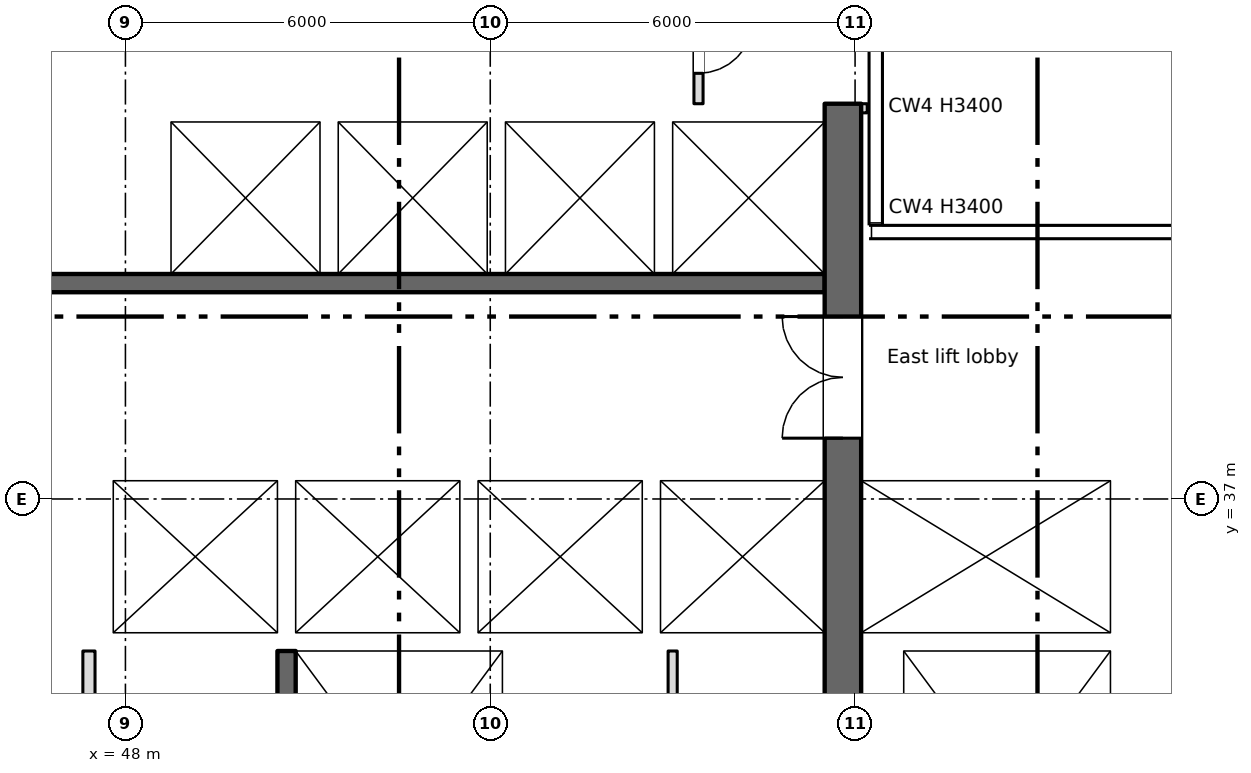
"""IFC4 building model, lengths in metres.
Left out: names, types, materials, properties, quantities, classifications, styles, units other than length and angle.
Written with IfcOpenShell. Run it as: python <this file> out.ifc"""

import sys

from ifc_helpers import new_model, si_unit, direction, frame, frame_2d, origin, place, context, subcontext, project, spatial, rectangle, extrude, element, fill, save


model = new_model("IFC4")
c1 = context("Model", 3, precision=1e-05, world=origin(), true_north=direction((0.0, 1.0)))
c2 = subcontext(c1, "Body", "Model", "MODEL_VIEW")
j1 = project(units=[si_unit("LENGTHUNIT", "METRE"), si_unit("PLANEANGLEUNIT", "RADIAN")], contexts=[c1])
p1 = place(None, origin())
s1 = spatial("IfcSite", under=j1, at=p1, CompositionType="ELEMENT")
p2 = place(p1, origin())
s2 = spatial("IfcBuilding", under=s1, at=p2, CompositionType="ELEMENT")
p3 = place(p2, frame((0.0, 0.0, 246.95)))
s3 = spatial("IfcBuildingStorey", under=s2, at=p3, CompositionType="ELEMENT", Elevation=246.95)
p4 = place(p3, frame((64.35, 34.8, 0.0), z_axis=(0.0, 0.0, 1.0), x_axis=(0.0, 1.0, 0.0)))
e1 = element("IfcWall", 1, at=p4, inside=s3, PredefinedType="SHEAR", context=c2, shape_type="SweptSolid", body=[
    extrude(rectangle(XDim=6.45, YDim=0.3, at=frame_2d((3.225, 0.0))), origin(), (0.0, 0.0, 1.0), 3.4),
])
p5 = place(p3, frame((59.8, 28.4, 0.0), z_axis=(0.0, 0.0, 1.0), x_axis=(0.0, 1.0, 0.0)))
e2 = element("IfcWall", 2, at=p5, inside=s3, PredefinedType="SHEAR", context=c2, shape_type="SweptSolid", body=[
    extrude(rectangle(XDim=15.1, YDim=0.6, at=frame_2d((7.55, 0.0))), origin(), (0.0, 0.0, 1.0), 3.4),
])
p6 = place(p5, frame((9.6, 0.0, 0.0)))
e3 = element("IfcOpeningElement", 3, at=p6, cuts=e2, PredefinedType="OPENING", context=c2, shape_type="SweptSolid", body=[
    extrude(rectangle(XDim=2.0, YDim=2.1, at=frame_2d((1.0, 1.05))), frame((0.0, 0.31, 0.0), z_axis=(0.0, -1.0, 0.0), x_axis=(1.0, 0.0, 0.0)), (0.0, 0.0, 1.0), 0.62),
])
p7 = place(p3, frame((50.65, 34.5, 0.0), z_axis=(0.0, 0.0, 1.0), x_axis=(0.0, -1.0, 0.0)))
e4 = element("IfcWall", 4, at=p7, inside=s3, PredefinedType="SHEAR", context=c2, shape_type="SweptSolid", body=[
    extrude(rectangle(XDim=6.1, YDim=0.3, at=frame_2d((3.05, 0.0))), origin(), (0.0, 0.0, 1.0), 3.4),
])
p8 = place(p7, frame((4.95, 0.0, 0.0)))
e5 = element("IfcOpeningElement", 5, at=p8, cuts=e4, PredefinedType="OPENING", context=c2, shape_type="SweptSolid", body=[
    extrude(rectangle(XDim=1.1, YDim=2.1, at=frame_2d((0.55, 1.05))), frame((0.0, 0.16, 0.0), z_axis=(0.0, -1.0, 0.0), x_axis=(1.0, 0.0, 0.0)), (0.0, 0.0, 1.0), 0.32),
])
p9 = place(p3, frame((54.35, 28.4, 0.0), z_axis=(0.0, 0.0, 1.0), x_axis=(0.0, 1.0, 0.0)))
e6 = element("IfcWall", 6, at=p9, inside=s3, PredefinedType="SHEAR", context=c2, shape_type="SweptSolid", body=[
    extrude(rectangle(XDim=6.1, YDim=0.3, at=frame_2d((3.05, 0.0))), origin(), (0.0, 0.0, 1.0), 3.4),
])
p10 = place(p3, frame((60.45, 28.4, 0.0), z_axis=(0.0, 0.0, 1.0), x_axis=(0.0, 1.0, 0.0)))
e7 = element("IfcWall", 7, at=p10, inside=s3, PredefinedType="SHEAR", context=c2, shape_type="SweptSolid", body=[
    extrude(rectangle(XDim=6.1, YDim=0.7, at=frame_2d((3.05, 0.0))), origin(), (0.0, 0.0, 1.0), 3.4),
])
p11 = place(p3, frame((64.35, 28.4, 0.0), z_axis=(0.0, 0.0, 1.0), x_axis=(0.0, 1.0, 0.0)))
e8 = element("IfcWall", 8, at=p11, inside=s3, PredefinedType="SHEAR", context=c2, shape_type="SweptSolid", body=[
    extrude(rectangle(XDim=6.1, YDim=0.3, at=frame_2d((3.05, 0.0))), origin(), (0.0, 0.0, 1.0), 3.4),
])
p12 = place(p3, frame((47.3, 34.65, 0.0), z_axis=(0.0, 0.0, 1.0), x_axis=(1.0, 0.0, 0.0)))
e9 = element("IfcWall", 9, at=p12, inside=s3, PredefinedType="SHEAR", context=c2, shape_type="SweptSolid", body=[
    extrude(rectangle(XDim=12.2, YDim=0.3, at=frame_2d((6.1, 0.0))), origin(), (0.0, 0.0, 1.0), 3.4),
])
p13 = place(p12, frame((1.3, 0.0, 0.0)))
e10 = element("IfcOpeningElement", 10, at=p13, cuts=e9, PredefinedType="OPENING", context=c2, shape_type="SweptSolid", body=[
    extrude(rectangle(XDim=1.1, YDim=2.1, at=frame_2d((0.55, 1.05))), frame((0.0, 0.16, 0.0), z_axis=(0.0, -1.0, 0.0), x_axis=(1.0, 0.0, 0.0)), (0.0, 0.0, 1.0), 0.32),
])
p14 = place(p3, frame((60.1, 34.65, 0.0), z_axis=(0.0, 0.0, 1.0), x_axis=(1.0, 0.0, 0.0)))
e11 = element("IfcWall", 11, at=p14, inside=s3, PredefinedType="SHEAR", context=c2, shape_type="SweptSolid", body=[
    extrude(rectangle(XDim=4.4, YDim=0.3, at=frame_2d((2.2, 0.0))), origin(), (0.0, 0.0, 1.0), 3.4),
])
p15 = place(p3, frame((47.3, 37.45, 0.0), z_axis=(0.0, 0.0, 1.0), x_axis=(1.0, 0.0, 0.0)))
e12 = element("IfcWall", 12, at=p15, inside=s3, PredefinedType="SHEAR", context=c2, shape_type="SweptSolid", body=[
    extrude(rectangle(XDim=12.2, YDim=0.3, at=frame_2d((6.1, 0.0))), origin(), (0.0, 0.0, 1.0), 3.4),
])
p16 = place(p15, frame((4.3, 0.0, 0.0)))
e13 = element("IfcOpeningElement", 13, at=p16, cuts=e12, PredefinedType="OPENING", context=c2, shape_type="SweptSolid", body=[
    extrude(rectangle(XDim=1.1, YDim=2.1, at=frame_2d((0.55, 1.05))), frame((0.0, 0.16, 0.0), z_axis=(0.0, -1.0, 0.0), x_axis=(1.0, 0.0, 0.0)), (0.0, 0.0, 1.0), 0.32),
])
p17 = place(p15, frame((7.3, 0.0, 0.0)))
e14 = element("IfcOpeningElement", 14, at=p17, cuts=e12, PredefinedType="OPENING", context=c2, shape_type="SweptSolid", body=[
    extrude(rectangle(XDim=1.1, YDim=2.1, at=frame_2d((0.55, 1.05))), frame((0.0, 0.16, 0.0), z_axis=(0.0, -1.0, 0.0), x_axis=(1.0, 0.0, 0.0)), (0.0, 0.0, 1.0), 0.32),
])
p18 = place(p15, frame((10.3, 0.0, 0.0)))
e15 = element("IfcOpeningElement", 15, at=p18, cuts=e12, PredefinedType="OPENING", context=c2, shape_type="SweptSolid", body=[
    extrude(rectangle(XDim=1.1, YDim=2.1, at=frame_2d((0.55, 1.05))), frame((0.0, 0.16, 0.0), z_axis=(0.0, -1.0, 0.0), x_axis=(1.0, 0.0, 0.0)), (0.0, 0.0, 1.0), 0.32),
])
p19 = place(p3, frame((60.1, 37.45, 0.0), z_axis=(0.0, 0.0, 1.0), x_axis=(1.0, 0.0, 0.0)))
e16 = element("IfcWall", 16, at=p19, inside=s3, PredefinedType="SHEAR", context=c2, shape_type="SweptSolid", body=[
    extrude(rectangle(XDim=4.1, YDim=0.3, at=frame_2d((2.05, 0.0))), origin(), (0.0, 0.0, 1.0), 3.4),
])
p20 = place(p19, frame((1.5, 0.0, 0.0)))
e17 = element("IfcOpeningElement", 17, at=p20, cuts=e16, PredefinedType="OPENING", context=c2, shape_type="SweptSolid", body=[
    extrude(rectangle(XDim=1.1, YDim=2.1, at=frame_2d((0.55, 1.05))), frame((0.0, 0.16, 0.0), z_axis=(0.0, -1.0, 0.0), x_axis=(1.0, 0.0, 0.0)), (0.0, 0.0, 1.0), 0.32),
])
p21 = place(p3, frame((47.55, 34.8, 0.0), z_axis=(0.0, 0.0, 1.0), x_axis=(0.0, 1.0, 0.0)))
e18 = element("IfcWall", 18, at=p21, inside=s3, PredefinedType="SHEAR", context=c2, shape_type="SweptSolid", body=[
    extrude(rectangle(XDim=2.5, YDim=0.5, at=frame_2d((1.25, 0.0))), origin(), (0.0, 0.0, 1.0), 3.4),
])
p22 = place(p3, frame((50.65, 34.8, 0.0), z_axis=(0.0, 0.0, 1.0), x_axis=(0.0, 1.0, 0.0)))
e19 = element("IfcWall", 19, at=p22, inside=s3, PredefinedType="SHEAR", context=c2, shape_type="SweptSolid", body=[
    extrude(rectangle(XDim=2.5, YDim=0.3, at=frame_2d((1.25, 0.0))), origin(), (0.0, 0.0, 1.0), 3.4),
])
p23 = place(p3, frame((18.5, 40.55, 0.0), z_axis=(0.0, 0.0, 1.0), x_axis=(1.0, 0.0, 0.0)))
e20 = element("IfcWall", 20, at=p23, inside=s3, PredefinedType="SHEAR", context=c2, shape_type="SweptSolid", body=[
    extrude(rectangle(XDim=41.0, YDim=0.3, at=frame_2d((20.5, 0.0))), origin(), (0.0, 0.0, 1.0), 3.4),
])
p24 = place(p23, frame((2.15, 0.0, 0.0)))
e21 = element("IfcOpeningElement", 21, at=p24, cuts=e20, PredefinedType="OPENING", context=c2, shape_type="SweptSolid", body=[
    extrude(rectangle(XDim=0.9, YDim=2.1, at=frame_2d((0.45, 1.05))), frame((0.0, 0.16, 0.0), z_axis=(0.0, -1.0, 0.0), x_axis=(1.0, 0.0, 0.0)), (0.0, 0.0, 1.0), 0.32),
])
p25 = place(p23, frame((15.9, 0.0, 0.0)))
e22 = element("IfcOpeningElement", 22, at=p25, cuts=e20, PredefinedType="OPENING", context=c2, shape_type="SweptSolid", body=[
    extrude(rectangle(XDim=0.9, YDim=2.1, at=frame_2d((0.45, 1.05))), frame((0.0, 0.16, 0.0), z_axis=(0.0, -1.0, 0.0), x_axis=(1.0, 0.0, 0.0)), (0.0, 0.0, 1.0), 0.32),
])
p26 = place(p23, frame((21.4, 0.0, 0.0)))
e23 = element("IfcOpeningElement", 23, at=p26, cuts=e20, PredefinedType="OPENING", context=c2, shape_type="SweptSolid", body=[
    extrude(rectangle(XDim=0.9, YDim=2.1, at=frame_2d((0.45, 1.05))), frame((0.0, 0.16, 0.0), z_axis=(0.0, -1.0, 0.0), x_axis=(1.0, 0.0, 0.0)), (0.0, 0.0, 1.0), 0.32),
])
p27 = place(p23, frame((26.9, 0.0, 0.0)))
e24 = element("IfcOpeningElement", 24, at=p27, cuts=e20, PredefinedType="OPENING", context=c2, shape_type="SweptSolid", body=[
    extrude(rectangle(XDim=0.9, YDim=2.1, at=frame_2d((0.45, 1.05))), frame((0.0, 0.16, 0.0), z_axis=(0.0, -1.0, 0.0), x_axis=(1.0, 0.0, 0.0)), (0.0, 0.0, 1.0), 0.32),
])
p28 = place(p23, frame((6.175, 0.0, 0.0)))
e25 = element("IfcOpeningElement", 25, at=p28, cuts=e20, PredefinedType="OPENING", context=c2, shape_type="SweptSolid", body=[
    extrude(rectangle(XDim=1.1, YDim=2.1, at=frame_2d((0.55, 1.05))), frame((0.0, 0.16, 0.0), z_axis=(0.0, -1.0, 0.0), x_axis=(1.0, 0.0, 0.0)), (0.0, 0.0, 1.0), 0.32),
])
p29 = place(p23, frame((8.925, 0.0, 0.0)))
e26 = element("IfcOpeningElement", 26, at=p29, cuts=e20, PredefinedType="OPENING", context=c2, shape_type="SweptSolid", body=[
    extrude(rectangle(XDim=1.1, YDim=2.1, at=frame_2d((0.55, 1.05))), frame((0.0, 0.16, 0.0), z_axis=(0.0, -1.0, 0.0), x_axis=(1.0, 0.0, 0.0)), (0.0, 0.0, 1.0), 0.32),
])
p30 = place(p23, frame((11.675, 0.0, 0.0)))
e27 = element("IfcOpeningElement", 27, at=p30, cuts=e20, PredefinedType="OPENING", context=c2, shape_type="SweptSolid", body=[
    extrude(rectangle(XDim=1.1, YDim=2.1, at=frame_2d((0.55, 1.05))), frame((0.0, 0.16, 0.0), z_axis=(0.0, -1.0, 0.0), x_axis=(1.0, 0.0, 0.0)), (0.0, 0.0, 1.0), 0.32),
])
p31 = place(p23, frame((30.925, 0.0, 0.0)))
e28 = element("IfcOpeningElement", 28, at=p31, cuts=e20, PredefinedType="OPENING", context=c2, shape_type="SweptSolid", body=[
    extrude(rectangle(XDim=1.1, YDim=2.1, at=frame_2d((0.55, 1.05))), frame((0.0, 0.16, 0.0), z_axis=(0.0, -1.0, 0.0), x_axis=(1.0, 0.0, 0.0)), (0.0, 0.0, 1.0), 0.32),
])
p32 = place(p23, frame((33.675, 0.0, 0.0)))
e29 = element("IfcOpeningElement", 29, at=p32, cuts=e20, PredefinedType="OPENING", context=c2, shape_type="SweptSolid", body=[
    extrude(rectangle(XDim=1.1, YDim=2.1, at=frame_2d((0.55, 1.05))), frame((0.0, 0.16, 0.0), z_axis=(0.0, -1.0, 0.0), x_axis=(1.0, 0.0, 0.0)), (0.0, 0.0, 1.0), 0.32),
])
p33 = place(p23, frame((36.375, 0.0, 0.0)))
e30 = element("IfcOpeningElement", 30, at=p33, cuts=e20, PredefinedType="OPENING", context=c2, shape_type="SweptSolid", body=[
    extrude(rectangle(XDim=1.2, YDim=2.1, at=frame_2d((0.6, 1.05))), frame((0.0, 0.16, 0.0), z_axis=(0.0, -1.0, 0.0), x_axis=(1.0, 0.0, 0.0)), (0.0, 0.0, 1.0), 0.32),
])
p34 = place(p23, frame((39.15, 0.0, 0.0)))
e31 = element("IfcOpeningElement", 31, at=p34, cuts=e20, PredefinedType="OPENING", context=c2, shape_type="SweptSolid", body=[
    extrude(rectangle(XDim=1.2, YDim=2.1, at=frame_2d((0.6, 1.05))), frame((0.0, 0.16, 0.0), z_axis=(0.0, -1.0, 0.0), x_axis=(1.0, 0.0, 0.0)), (0.0, 0.0, 1.0), 0.32),
])
p35 = place(p3, frame((18.5, 43.35, 0.0), z_axis=(0.0, 0.0, 1.0), x_axis=(1.0, 0.0, 0.0)))
e32 = element("IfcWall", 32, at=p35, inside=s3, PredefinedType="SHEAR", context=c2, shape_type="SweptSolid", body=[
    extrude(rectangle(XDim=41.0, YDim=0.3, at=frame_2d((20.5, 0.0))), origin(), (0.0, 0.0, 1.0), 3.4),
])
for number, where, z_axis, x_axis in (
    (33, (53.65, 34.8, 0.0), (0.0, 0.0, 1.0), (0.0, 1.0, 0.0)),
    (34, (56.65, 34.8, 0.0), (0.0, 0.0, 1.0), (0.0, 1.0, 0.0)),
    (35, (48.6, 40.7, 0.0), (0.0, 0.0, 1.0), (0.0, 1.0, 0.0)),
    (36, (51.35, 40.7, 0.0), (0.0, 0.0, 1.0), (0.0, 1.0, 0.0)),
    (37, (54.1, 40.7, 0.0), (0.0, 0.0, 1.0), (0.0, 1.0, 0.0)),
    (38, (56.85, 40.7, 0.0), (0.0, 0.0, 1.0), (0.0, 1.0, 0.0)),
):
    element("IfcWall", number, at=place(p3, frame(where, z_axis=z_axis, x_axis=x_axis)), inside=s3, PredefinedType="SHEAR", context=c2, shape_type="SweptSolid", body=[
        extrude(rectangle(XDim=2.5, YDim=0.3, at=frame_2d((1.25, 0.0))), origin(), (0.0, 0.0, 1.0), 3.4),
    ])
p36 = place(p3, frame((47.4, 28.4, 0.0), z_axis=(0.0, 0.0, 1.0), x_axis=(0.0, 1.0, 0.0)))
e39 = element("IfcWall", 39, at=p36, inside=s3, PredefinedType="PARTITIONING", context=c2, shape_type="SweptSolid", body=[
    extrude(rectangle(XDim=6.1, YDim=0.2, at=frame_2d((3.05, 0.0))), origin(), (0.0, 0.0, 1.0), 3.4),
])
p37 = place(p3, frame((57.0, 28.4, 0.0), z_axis=(0.0, 0.0, 1.0), x_axis=(0.0, 1.0, 0.0)))
e40 = element("IfcWall", 40, at=p37, inside=s3, PredefinedType="PARTITIONING", context=c2, shape_type="SweptSolid", body=[
    extrude(rectangle(XDim=6.1, YDim=0.15, at=frame_2d((3.05, 0.0))), origin(), (0.0, 0.0, 1.0), 3.4),
])
p38 = place(p3, frame((57.425, 45.4, 0.0), z_axis=(0.0, 0.0, 1.0), x_axis=(0.0, -1.0, 0.0)))
e41 = element("IfcWall", 41, at=p38, inside=s3, PredefinedType="PARTITIONING", context=c2, shape_type="SweptSolid", body=[
    extrude(rectangle(XDim=1.9, YDim=0.15, at=frame_2d((0.95, 0.0))), origin(), (0.0, 0.0, 1.0), 3.4),
])
p39 = place(p38, frame((0.5, 0.0, 0.0)))
e42 = element("IfcOpeningElement", 42, at=p39, cuts=e41, PredefinedType="OPENING", context=c2, shape_type="SweptSolid", body=[
    extrude(rectangle(XDim=0.9, YDim=2.1, at=frame_2d((0.45, 1.05))), frame((0.0, 0.085, 0.0), z_axis=(0.0, -1.0, 0.0), x_axis=(1.0, 0.0, 0.0)), (0.0, 0.0, 1.0), 0.17),
])
p40 = place(p3, frame((60.15, 43.35, 0.0), z_axis=(0.0, 0.0, 1.0), x_axis=(0.0, 1.0, 0.0)))
e43 = element("IfcWall", 43, at=p40, inside=s3, PredefinedType="PARTITIONING", context=c2, shape_type="SweptSolid", body=[
    extrude(rectangle(XDim=0.15, YDim=0.1, at=frame_2d((0.075, 0.0))), origin(), (0.0, 0.0, 1.0), 3.4),
])
p41 = place(p39, origin())
e44 = element("IfcDoor", 44, at=p41, inside=s3, OperationType="SINGLE_SWING_LEFT", PredefinedType="DOOR", context=c2, shape_type="SweptSolid", body=[
    extrude(rectangle(XDim=0.9, YDim=2.1, at=frame_2d((0.45, 1.05))), frame((0.0, 0.025, 0.0), z_axis=(0.0, -1.0, 0.0), x_axis=(1.0, 0.0, 0.0)), (0.0, 0.0, 1.0), 0.05),
])
fill(e42, e44)
p42 = place(p16, origin())
e45 = element("IfcDoor", 45, at=p42, inside=s3, OperationType="SLIDING_TO_LEFT", PredefinedType="DOOR", context=c2, shape_type="SweptSolid", body=[
    extrude(rectangle(XDim=1.1, YDim=2.1, at=frame_2d((0.55, 1.05))), frame((0.0, 0.025, 0.0), z_axis=(0.0, -1.0, 0.0), x_axis=(1.0, 0.0, 0.0)), (0.0, 0.0, 1.0), 0.05),
])
fill(e13, e45)
p43 = place(p17, origin())
e46 = element("IfcDoor", 46, at=p43, inside=s3, OperationType="SLIDING_TO_LEFT", PredefinedType="DOOR", context=c2, shape_type="SweptSolid", body=[
    extrude(rectangle(XDim=1.1, YDim=2.1, at=frame_2d((0.55, 1.05))), frame((0.0, 0.025, 0.0), z_axis=(0.0, -1.0, 0.0), x_axis=(1.0, 0.0, 0.0)), (0.0, 0.0, 1.0), 0.05),
])
fill(e14, e46)
p44 = place(p18, origin())
e47 = element("IfcDoor", 47, at=p44, inside=s3, OperationType="SLIDING_TO_LEFT", PredefinedType="DOOR", context=c2, shape_type="SweptSolid", body=[
    extrude(rectangle(XDim=1.1, YDim=2.1, at=frame_2d((0.55, 1.05))), frame((0.0, 0.025, 0.0), z_axis=(0.0, -1.0, 0.0), x_axis=(1.0, 0.0, 0.0)), (0.0, 0.0, 1.0), 0.05),
])
fill(e15, e47)
p45 = place(p31, origin())
e48 = element("IfcDoor", 48, at=p45, inside=s3, OperationType="SLIDING_TO_LEFT", PredefinedType="DOOR", context=c2, shape_type="SweptSolid", body=[
    extrude(rectangle(XDim=1.1, YDim=2.1, at=frame_2d((0.55, 1.05))), frame((0.0, 0.025, 0.0), z_axis=(0.0, -1.0, 0.0), x_axis=(1.0, 0.0, 0.0)), (0.0, 0.0, 1.0), 0.05),
])
fill(e28, e48)
p46 = place(p32, origin())
e49 = element("IfcDoor", 49, at=p46, inside=s3, OperationType="SLIDING_TO_LEFT", PredefinedType="DOOR", context=c2, shape_type="SweptSolid", body=[
    extrude(rectangle(XDim=1.1, YDim=2.1, at=frame_2d((0.55, 1.05))), frame((0.0, 0.025, 0.0), z_axis=(0.0, -1.0, 0.0), x_axis=(1.0, 0.0, 0.0)), (0.0, 0.0, 1.0), 0.05),
])
fill(e29, e49)
p47 = place(p33, origin())
e50 = element("IfcDoor", 50, at=p47, inside=s3, OperationType="SLIDING_TO_LEFT", PredefinedType="DOOR", context=c2, shape_type="SweptSolid", body=[
    extrude(rectangle(XDim=1.2, YDim=2.1, at=frame_2d((0.6, 1.05))), frame((0.0, 0.025, 0.0), z_axis=(0.0, -1.0, 0.0), x_axis=(1.0, 0.0, 0.0)), (0.0, 0.0, 1.0), 0.05),
])
fill(e30, e50)
p48 = place(p34, origin())
e51 = element("IfcDoor", 51, at=p48, inside=s3, OperationType="SLIDING_TO_LEFT", PredefinedType="DOOR", context=c2, shape_type="SweptSolid", body=[
    extrude(rectangle(XDim=1.2, YDim=2.1, at=frame_2d((0.6, 1.05))), frame((0.0, 0.025, 0.0), z_axis=(0.0, -1.0, 0.0), x_axis=(1.0, 0.0, 0.0)), (0.0, 0.0, 1.0), 0.05),
])
fill(e31, e51)
p49 = place(p20, origin())
e52 = element("IfcDoor", 52, at=p49, inside=s3, OperationType="SLIDING_TO_LEFT", PredefinedType="DOOR", context=c2, shape_type="SweptSolid", body=[
    extrude(rectangle(XDim=1.1, YDim=2.1, at=frame_2d((0.55, 1.05))), frame((0.0, 0.025, 0.0), z_axis=(0.0, -1.0, 0.0), x_axis=(1.0, 0.0, 0.0)), (0.0, 0.0, 1.0), 0.05),
])
fill(e17, e52)
p50 = place(p13, origin())
e53 = element("IfcDoor", 53, at=p50, inside=s3, OperationType="SLIDING_TO_LEFT", PredefinedType="DOOR", context=c2, shape_type="SweptSolid", body=[
    extrude(rectangle(XDim=1.1, YDim=2.1, at=frame_2d((0.55, 1.05))), frame((0.0, 0.025, 0.0), z_axis=(0.0, -1.0, 0.0), x_axis=(1.0, 0.0, 0.0)), (0.0, 0.0, 1.0), 0.05),
])
fill(e10, e53)
p51 = place(p6, origin())
e54 = element("IfcDoor", 54, at=p51, inside=s3, OperationType="DOUBLE_DOOR_SINGLE_SWING", PredefinedType="DOOR", context=c2, shape_type="SweptSolid", body=[
    extrude(rectangle(XDim=2.0, YDim=2.1, at=frame_2d((1.0, 1.05))), frame((0.0, 0.025, 0.0), z_axis=(0.0, -1.0, 0.0), x_axis=(1.0, 0.0, 0.0)), (0.0, 0.0, 1.0), 0.05),
])
fill(e3, e54)
save(model, sys.argv[1])
